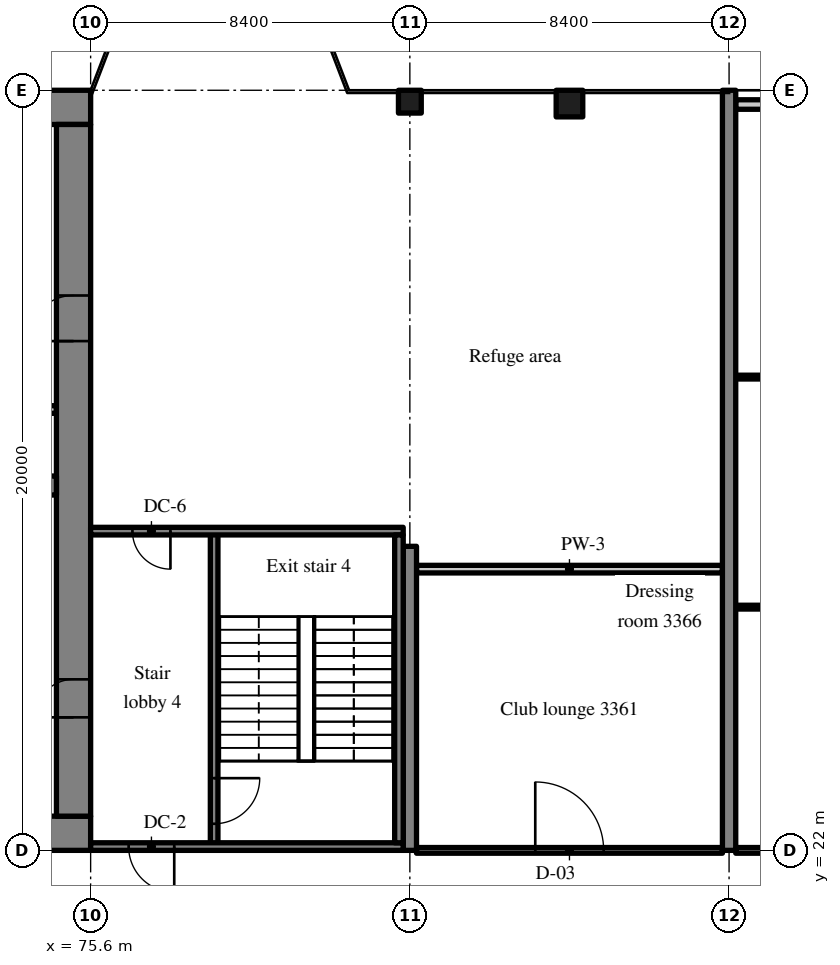
"""IFC4 building model, lengths in metres.
Left out: names, types, materials, properties, quantities, classifications, styles, units other than length and angle.
Written with IfcOpenShell. Run it as: python <this file> out.ifc"""

import sys

from ifc_helpers import new_model, si_unit, direction, frame, frame_2d, origin, origin_2d, place, context, subcontext, project, spatial, rectangle, extrude, source, transform, mapped, element, fill, save


model = new_model("IFC4")
c1 = context("Model", 3, precision=1e-05, world=origin(), true_north=direction((0.0, 1.0)))
c2 = subcontext(c1, "Body", "Model", "MODEL_VIEW")
j1 = project(units=[si_unit("LENGTHUNIT", "METRE"), si_unit("PLANEANGLEUNIT", "RADIAN")], contexts=[c1])
p1 = place(None, origin())
s1 = spatial("IfcSite", under=j1, at=p1, CompositionType="ELEMENT")
p2 = place(p1, origin())
s2 = spatial("IfcBuilding", under=s1, at=p2, CompositionType="ELEMENT")
p3 = place(p2, frame((0.0, 0.0, 137.0)))
s3 = spatial("IfcBuildingStorey", under=s2, at=p3, CompositionType="ELEMENT", Elevation=137.0)
m1 = source(origin(), c2, "Body", "SweptSolid", [
    extrude(rectangle(XDim=50.4, YDim=0.9, at=frame_2d((25.2, 0.0))), origin(), (0.0, 0.0, 1.0), 3.52),
])
p4 = place(p3, frame((25.2, 22.45, 0.0), z_axis=(0.0, 0.0, 1.0), x_axis=(1.0, 0.0, 0.0)))
e1 = element("IfcWall", 1, at=p4, inside=s3, PredefinedType="SHEAR", context=c2, shape_type="MappedRepresentation", body=[
    mapped(m1, transform((0.0, 0.0, 0.0), scale=1.0)),
])
m2 = source(origin(), c2, "Body", "SweptSolid", [
    extrude(rectangle(XDim=1.8, YDim=2.1, at=frame_2d((0.9, 1.05))), frame((0.0, 0.46, 0.0), z_axis=(0.0, -1.0, 0.0), x_axis=(1.0, 0.0, 0.0)), (0.0, 0.0, 1.0), 0.92),
])
p5 = place(p4, frame((15.9, 0.0, 0.0)))
e2 = element("IfcOpeningElement", 2, at=p5, cuts=e1, PredefinedType="OPENING", context=c2, shape_type="MappedRepresentation", body=[
    mapped(m2, transform((0.0, 0.0, 0.0), scale=1.0)),
])
m3 = source(origin(), c2, "Body", "SweptSolid", [
    extrude(rectangle(XDim=1.2, YDim=2.1, at=frame_2d((0.6, 1.05))), frame((0.0, 0.46, 0.0), z_axis=(0.0, -1.0, 0.0), x_axis=(1.0, 0.0, 0.0)), (0.0, 0.0, 1.0), 0.92),
])
p6 = place(p4, frame((26.975, 0.0, 0.0)))
e3 = element("IfcOpeningElement", 3, at=p6, cuts=e1, PredefinedType="OPENING", context=c2, shape_type="MappedRepresentation", body=[
    mapped(m3, transform((0.0, 0.0, 0.0), scale=1.0)),
])
m4 = source(origin(), c2, "Body", "SweptSolid", [
    extrude(rectangle(XDim=0.9, YDim=2.1, at=frame_2d((0.45, 1.05))), frame((0.0, 0.46, 0.0), z_axis=(0.0, -1.0, 0.0), x_axis=(1.0, 0.0, 0.0)), (0.0, 0.0, 1.0), 0.92),
])
p7 = place(p4, frame((34.5, 0.0, 0.0)))
e4 = element("IfcOpeningElement", 4, at=p7, cuts=e1, PredefinedType="OPENING", context=c2, shape_type="MappedRepresentation", body=[
    mapped(m4, transform((0.0, 0.0, 0.0), scale=1.0)),
])
p8 = place(p4, frame((31.5, 0.0, 0.0)))
e5 = element("IfcOpeningElement", 5, at=p8, cuts=e1, PredefinedType="OPENING", context=c2, shape_type="MappedRepresentation", body=[
    mapped(m4, transform((0.0, 0.0, 0.0), scale=1.0)),
])
p9 = place(p4, frame((39.788, 0.0, 0.0)))
e6 = element("IfcOpeningElement", 6, at=p9, cuts=e1, PredefinedType="OPENING", context=c2, shape_type="MappedRepresentation", body=[
    mapped(m4, transform((0.0, 0.0, 0.0), scale=1.0)),
])
p10 = place(p4, frame((36.762, 0.0, 0.0)))
e7 = element("IfcOpeningElement", 7, at=p10, cuts=e1, PredefinedType="OPENING", context=c2, shape_type="MappedRepresentation", body=[
    mapped(m4, transform((0.0, 0.0, 0.0), scale=1.0)),
])
p11 = place(p4, frame((6.45, 0.0, 0.0)))
e8 = element("IfcOpeningElement", 8, at=p11, cuts=e1, PredefinedType="OPENING", context=c2, shape_type="MappedRepresentation", body=[
    mapped(m3, transform((0.0, 0.0, 0.0), scale=1.0)),
])
p12 = place(p4, frame((47.775, 0.0, 0.0)))
e9 = element("IfcOpeningElement", 9, at=p12, cuts=e1, PredefinedType="OPENING", context=c2, shape_type="MappedRepresentation", body=[
    mapped(m3, transform((0.0, 0.0, 0.0), scale=1.0)),
])
p13 = place(p3, frame((25.2, 41.55, 0.0), z_axis=(0.0, 0.0, 1.0), x_axis=(1.0, 0.0, 0.0)))
e10 = element("IfcWall", 10, at=p13, inside=s3, PredefinedType="SHEAR", context=c2, shape_type="MappedRepresentation", body=[
    mapped(m1, transform((0.0, 0.0, 0.0), scale=1.0)),
])
m5 = source(origin(), c2, "Body", "SweptSolid", [
    extrude(rectangle(XDim=18.2, YDim=0.9, at=frame_2d((9.1, 0.0))), origin(), (0.0, 0.0, 1.0), 3.52),
])
p14 = place(p3, frame((75.15, 22.9, 0.0), z_axis=(0.0, 0.0, 1.0), x_axis=(0.0, 1.0, 0.0)))
e11 = element("IfcWall", 11, at=p14, inside=s3, PredefinedType="SHEAR", context=c2, shape_type="MappedRepresentation", body=[
    mapped(m5, transform((0.0, 0.0, 0.0), scale=1.0)),
])
m6 = source(origin(), c2, "Body", "SweptSolid", [
    extrude(rectangle(XDim=1.0, YDim=2.1, at=frame_2d((0.5, 1.05))), frame((0.0, 0.46, 0.0), z_axis=(0.0, -1.0, 0.0), x_axis=(1.0, 0.0, 0.0)), (0.0, 0.0, 1.0), 0.92),
])
p15 = place(p14, frame((2.6, 0.0, 0.0)))
e12 = element("IfcOpeningElement", 12, at=p15, cuts=e11, PredefinedType="OPENING", context=c2, shape_type="MappedRepresentation", body=[
    mapped(m6, transform((0.0, 0.0, 0.0), scale=1.0)),
])
p16 = place(p14, frame((12.5, 0.0, 0.0)))
e13 = element("IfcOpeningElement", 13, at=p16, cuts=e11, PredefinedType="OPENING", context=c2, shape_type="MappedRepresentation", body=[
    mapped(m3, transform((0.0, 0.0, 0.0), scale=1.0)),
])
m7 = source(origin(), c2, "Body", "SweptSolid", [
    extrude(rectangle(XDim=7.25, YDim=0.5, at=frame_2d((3.625, 0.0))), origin(), (0.0, 0.0, 1.0), 3.52),
])
p17 = place(p3, frame((67.45, 31.6, 0.0), z_axis=(0.0, 0.0, 1.0), x_axis=(1.0, 0.0, 0.0)))
e14 = element("IfcWall", 14, at=p17, inside=s3, PredefinedType="SHEAR", context=c2, shape_type="MappedRepresentation", body=[
    mapped(m7, transform((0.0, 0.0, 0.0), scale=1.0)),
])
m8 = source(origin(), c2, "Body", "SweptSolid", [
    extrude(rectangle(XDim=1.1, YDim=2.1, at=frame_2d((0.55, 1.05))), frame((0.0, 0.26, 0.0), z_axis=(0.0, -1.0, 0.0), x_axis=(1.0, 0.0, 0.0)), (0.0, 0.0, 1.0), 0.52),
])
p18 = place(p17, frame((5.575, 0.0, 0.0)))
e15 = element("IfcOpeningElement", 15, at=p18, cuts=e14, PredefinedType="OPENING", context=c2, shape_type="MappedRepresentation", body=[
    mapped(m8, transform((0.0, 0.0, 0.0), scale=1.0)),
])
m9 = source(origin(), c2, "Body", "SweptSolid", [
    extrude(rectangle(XDim=8.0, YDim=0.35, at=frame_2d((4.0, 0.0))), origin(), (0.0, 0.0, 1.0), 3.52),
])
p19 = place(p3, frame((84.0, 22.0, 0.0), z_axis=(0.0, 0.0, 1.0), x_axis=(0.0, 1.0, 0.0)))
e16 = element("IfcWall", 16, at=p19, inside=s3, PredefinedType="SHEAR", context=c2, shape_type="MappedRepresentation", body=[
    mapped(m9, transform((0.0, 0.0, 0.0), scale=1.0)),
])
m10 = source(origin(), c2, "Body", "SweptSolid", [
    extrude(rectangle(XDim=20.0, YDim=0.35, at=frame_2d((10.0, 0.0))), origin(), (0.0, 0.0, 1.0), 3.52),
])
p20 = place(p3, frame((92.4, 22.0, 0.0), z_axis=(0.0, 0.0, 1.0), x_axis=(0.0, 1.0, 0.0)))
e17 = element("IfcWall", 17, at=p20, inside=s3, PredefinedType="SHEAR", context=c2, shape_type="MappedRepresentation", body=[
    mapped(m10, transform((0.0, 0.0, 0.0), scale=1.0)),
])
m11 = source(origin(), c2, "Body", "SweptSolid", [
    extrude(rectangle(XDim=0.6, YDim=0.6, at=origin_2d()), origin(), (0.0, 0.0, 1.0), 3.52),
])
p21 = place(p3, frame((84.0, 41.7, 0.0), z_axis=(0.0, 0.0, 1.0), x_axis=(1.0, 0.0, 0.0)))
e18 = element("IfcColumn", 18, at=p21, inside=s3, PredefinedType="COLUMN", context=c2, shape_type="MappedRepresentation", body=[
    mapped(m11, transform((0.0, 0.0, 0.0), scale=1.0)),
])
m12 = source(origin(), c2, "Body", "SweptSolid", [
    extrude(rectangle(XDim=0.7, YDim=0.7, at=origin_2d()), origin(), (0.0, 0.0, 1.0), 3.52),
])
p22 = place(p3, frame((88.2, 41.65, 0.0), z_axis=(0.0, 0.0, 1.0), x_axis=(1.0, 0.0, 0.0)))
e19 = element("IfcColumn", 19, at=p22, inside=s3, PredefinedType="COLUMN", context=c2, shape_type="MappedRepresentation", body=[
    mapped(m12, transform((0.0, 0.0, 0.0), scale=1.0)),
])
m13 = source(origin(), c2, "Body", "SweptSolid", [
    extrude(rectangle(XDim=4.07, YDim=0.25, at=frame_2d((2.035, 0.0))), origin(), (0.0, 0.0, 1.0), 2.82),
])
p23 = place(p3, frame((96.645, 41.625, 0.0), z_axis=(0.0, 0.0, 1.0), x_axis=(-1.0, 0.0, 0.0)))
e20 = element("IfcWall", 20, at=p23, inside=s3, PredefinedType="SOLIDWALL", context=c2, shape_type="MappedRepresentation", body=[
    mapped(m13, transform((0.0, 0.0, 0.0), scale=1.0)),
])
m14 = source(origin(), c2, "Body", "SweptSolid", [
    extrude(rectangle(XDim=1.5, YDim=1.5, at=frame_2d((0.75, 0.75))), frame((0.0, 0.135, 0.0), z_axis=(0.0, -1.0, 0.0), x_axis=(1.0, 0.0, 0.0)), (0.0, 0.0, 1.0), 0.27),
])
p24 = place(p23, frame((1.285, 0.0, 0.9)))
e21 = element("IfcOpeningElement", 21, at=p24, cuts=e20, PredefinedType="OPENING", context=c2, shape_type="MappedRepresentation", body=[
    mapped(m14, transform((0.0, 0.0, 0.0), scale=1.0)),
])
m15 = source(origin(), c2, "Body", "SweptSolid", [
    extrude(rectangle(XDim=2.25, YDim=0.2, at=frame_2d((1.125, 0.0))), origin(), (0.0, 0.0, 1.0), 3.52),
])
p25 = place(p3, frame((72.45, 33.6, 0.0), z_axis=(0.0, 0.0, 1.0), x_axis=(1.0, 0.0, 0.0)))
e22 = element("IfcWall", 22, at=p25, inside=s3, PredefinedType="SOLIDWALL", context=c2, shape_type="MappedRepresentation", body=[
    mapped(m15, transform((0.0, 0.0, 0.0), scale=1.0)),
])
m16 = source(origin(), c2, "Body", "SweptSolid", [
    extrude(rectangle(XDim=8.3, YDim=0.2, at=frame_2d((4.15, 0.0))), origin(), (0.0, 0.0, 1.0), 3.52),
])
p26 = place(p3, frame((78.85, 22.1, 0.0), z_axis=(0.0, 0.0, 1.0), x_axis=(0.0, 1.0, 0.0)))
e23 = element("IfcWall", 23, at=p26, inside=s3, PredefinedType="SOLIDWALL", context=c2, shape_type="MappedRepresentation", body=[
    mapped(m16, transform((0.0, 0.0, 0.0), scale=1.0)),
])
m17 = source(origin(), c2, "Body", "SweptSolid", [
    extrude(rectangle(XDim=1.2, YDim=2.1, at=frame_2d((0.6, 1.05))), frame((0.0, 0.11, 0.0), z_axis=(0.0, -1.0, 0.0), x_axis=(1.0, 0.0, 0.0)), (0.0, 0.0, 1.0), 0.22),
])
p27 = place(p26, frame((0.6, 0.0, 0.0)))
e24 = element("IfcOpeningElement", 24, at=p27, cuts=e23, PredefinedType="OPENING", context=c2, shape_type="MappedRepresentation", body=[
    mapped(m17, transform((0.0, 0.0, 0.0), scale=1.0)),
])
m18 = source(origin(), c2, "Body", "SweptSolid", [
    extrude(rectangle(XDim=8.225, YDim=0.2, at=frame_2d((4.112, 0.0))), origin(), (0.0, 0.0, 1.0), 3.52),
])
p28 = place(p3, frame((83.825, 22.1, 0.0), z_axis=(0.0, 0.0, 1.0), x_axis=(-1.0, 0.0, 0.0)))
e25 = element("IfcWall", 25, at=p28, inside=s3, PredefinedType="SOLIDWALL", context=c2, shape_type="MappedRepresentation", body=[
    mapped(m18, transform((0.0, 0.0, 0.0), scale=1.0)),
])
p29 = place(p28, frame((6.025, 0.0, 0.0)))
e26 = element("IfcOpeningElement", 26, at=p29, cuts=e25, PredefinedType="OPENING", context=c2, shape_type="MappedRepresentation", body=[
    mapped(m17, transform((0.0, 0.0, 0.0), scale=1.0)),
])
p30 = place(p3, frame((83.825, 30.4, 0.0), z_axis=(0.0, 0.0, 1.0), x_axis=(-1.0, 0.0, 0.0)))
e27 = element("IfcWall", 27, at=p30, inside=s3, PredefinedType="SOLIDWALL", context=c2, shape_type="MappedRepresentation", body=[
    mapped(m18, transform((0.0, 0.0, 0.0), scale=1.0)),
])
m19 = source(origin(), c2, "Body", "SweptSolid", [
    extrude(rectangle(XDim=1.0, YDim=2.1, at=frame_2d((0.5, 1.05))), frame((0.0, 0.11, 0.0), z_axis=(0.0, -1.0, 0.0), x_axis=(1.0, 0.0, 0.0)), (0.0, 0.0, 1.0), 0.22),
])
p31 = place(p30, frame((6.125, 0.0, 0.0)))
e28 = element("IfcOpeningElement", 28, at=p31, cuts=e27, PredefinedType="OPENING", context=c2, shape_type="MappedRepresentation", body=[
    mapped(m19, transform((0.0, 0.0, 0.0), scale=1.0)),
])
m20 = source(origin(), c2, "Body", "SweptSolid", [
    extrude(rectangle(XDim=8.1, YDim=0.225, at=frame_2d((4.05, 0.0))), origin(), (0.0, 0.0, 1.0), 3.52),
])
p32 = place(p3, frame((83.713, 22.2, 0.0), z_axis=(0.0, 0.0, 1.0), x_axis=(0.0, 1.0, 0.0)))
e29 = element("IfcWall", 29, at=p32, inside=s3, PredefinedType="SOLIDWALL", context=c2, shape_type="MappedRepresentation", body=[
    mapped(m20, transform((0.0, 0.0, 0.0), scale=1.0)),
])
m21 = source(origin(), c2, "Body", "SweptSolid", [
    extrude(rectangle(XDim=8.05, YDim=0.15, at=frame_2d((4.025, 0.0))), origin(), (0.0, 0.0, 1.0), 2.82),
])
p33 = place(p3, frame((84.175, 22.0, 0.0), z_axis=(0.0, 0.0, 1.0), x_axis=(1.0, 0.0, 0.0)))
e30 = element("IfcWall", 30, at=p33, inside=s3, PredefinedType="PARTITIONING", context=c2, shape_type="MappedRepresentation", body=[
    mapped(m21, transform((0.0, 0.0, 0.0), scale=1.0)),
])
m22 = source(origin(), c2, "Body", "SweptSolid", [
    extrude(rectangle(XDim=1.8, YDim=2.1, at=frame_2d((0.9, 1.05))), frame((0.0, 0.085, 0.0), z_axis=(0.0, -1.0, 0.0), x_axis=(1.0, 0.0, 0.0)), (0.0, 0.0, 1.0), 0.17),
])
p34 = place(p33, frame((3.125, 0.0, 0.0)))
e31 = element("IfcOpeningElement", 31, at=p34, cuts=e30, PredefinedType="OPENING", context=c2, shape_type="MappedRepresentation", body=[
    mapped(m22, transform((0.0, 0.0, 0.0), scale=1.0)),
])
m23 = source(origin(), c2, "Body", "SweptSolid", [
    extrude(rectangle(XDim=8.05, YDim=0.2, at=frame_2d((4.025, 0.0))), origin(), (0.0, 0.0, 1.0), 3.52),
])
p35 = place(p3, frame((84.175, 29.4, 0.0), z_axis=(0.0, 0.0, 1.0), x_axis=(1.0, 0.0, 0.0)))
e32 = element("IfcWall", 32, at=p35, inside=s3, PredefinedType="PARTITIONING", context=c2, shape_type="MappedRepresentation", body=[
    mapped(m23, transform((0.0, 0.0, 0.0), scale=1.0)),
])
m24 = source(origin(), c2, "Body", "SweptSolid", [
    extrude(rectangle(XDim=2.425, YDim=0.1, at=frame_2d((1.212, 0.0))), origin(), (0.0, 0.0, 1.0), 3.52),
])
p36 = place(p3, frame((92.575, 28.4, 0.0), z_axis=(0.0, 0.0, 1.0), x_axis=(1.0, 0.0, 0.0)))
e33 = element("IfcWall", 33, at=p36, inside=s3, PredefinedType="PARTITIONING", context=c2, shape_type="MappedRepresentation", body=[
    mapped(m24, transform((0.0, 0.0, 0.0), scale=1.0)),
])
m25 = source(origin(), c2, "Body", "SweptSolid", [
    extrude(rectangle(XDim=0.9, YDim=2.1, at=frame_2d((0.45, 1.05))), frame((0.0, 0.06, 0.0), z_axis=(0.0, -1.0, 0.0), x_axis=(1.0, 0.0, 0.0)), (0.0, 0.0, 1.0), 0.12),
])
p37 = place(p36, frame((0.763, 0.0, 0.0)))
e34 = element("IfcOpeningElement", 34, at=p37, cuts=e33, PredefinedType="OPENING", context=c2, shape_type="MappedRepresentation", body=[
    mapped(m25, transform((0.0, 0.0, 0.0), scale=1.0)),
])
m26 = source(origin(), c2, "Body", "SweptSolid", [
    extrude(rectangle(XDim=7.875, YDim=0.1, at=frame_2d((3.938, 0.0))), origin(), (0.0, 0.0, 1.0), 3.52),
])
p38 = place(p3, frame((92.575, 34.453, 0.0), z_axis=(0.0, 0.0, 1.0), x_axis=(1.0, 0.0, 0.0)))
e35 = element("IfcWall", 35, at=p38, inside=s3, PredefinedType="PARTITIONING", context=c2, shape_type="MappedRepresentation", body=[
    mapped(m26, transform((0.0, 0.0, 0.0), scale=1.0)),
])
m27 = source(origin(), c2, "Body", "SweptSolid", [
    extrude(rectangle(XDim=1.8, YDim=2.1, at=frame_2d((0.9, 1.05))), frame((0.0, 0.06, 0.0), z_axis=(0.0, -1.0, 0.0), x_axis=(1.0, 0.0, 0.0)), (0.0, 0.0, 1.0), 0.12),
])
p39 = place(p38, frame((3.037, 0.0, 0.0)))
e36 = element("IfcOpeningElement", 36, at=p39, cuts=e35, PredefinedType="OPENING", context=c2, shape_type="MappedRepresentation", body=[
    mapped(m27, transform((0.0, 0.0, 0.0), scale=1.0)),
])
m28 = source(origin(), c2, "Body", "SweptSolid", [
    extrude(rectangle(XDim=7.875, YDim=0.15, at=frame_2d((3.938, 0.0))), origin(), (0.0, 0.0, 1.0), 2.82),
])
p40 = place(p3, frame((92.575, 22.0, 0.0), z_axis=(0.0, 0.0, 1.0), x_axis=(1.0, 0.0, 0.0)))
e37 = element("IfcWall", 37, at=p40, inside=s3, PredefinedType="PARTITIONING", context=c2, shape_type="MappedRepresentation", body=[
    mapped(m28, transform((0.0, 0.0, 0.0), scale=1.0)),
])
m29 = source(origin(), c2, "Body", "SweptSolid", [
    extrude(rectangle(XDim=1.0, YDim=2.1, at=frame_2d((0.5, 1.05))), frame((0.0, 0.085, 0.0), z_axis=(0.0, -1.0, 0.0), x_axis=(1.0, 0.0, 0.0)), (0.0, 0.0, 1.0), 0.17),
])
p41 = place(p40, frame((6.475, 0.0, 0.0)))
e38 = element("IfcOpeningElement", 38, at=p41, cuts=e37, PredefinedType="OPENING", context=c2, shape_type="MappedRepresentation", body=[
    mapped(m29, transform((0.0, 0.0, 0.0), scale=1.0)),
])
m30 = source(origin(), c2, "Body", "SweptSolid", [
    extrude(rectangle(XDim=1.0, YDim=2.1, at=frame_2d((0.5, 1.05))), frame((0.0, 0.025, 0.0), z_axis=(0.0, -1.0, 0.0), x_axis=(1.0, 0.0, 0.0)), (0.0, 0.0, 1.0), 0.05),
])
p42 = place(p15, origin())
e39 = element("IfcDoor", 39, at=p42, inside=s3, OperationType="SINGLE_SWING_LEFT", PredefinedType="DOOR", context=c2, shape_type="MappedRepresentation", body=[
    mapped(m30, transform((0.0, 0.0, 0.0), scale=1.0)),
])
fill(e12, e39)
m31 = source(origin(), c2, "Body", "SweptSolid", [
    extrude(rectangle(XDim=1.2, YDim=2.1, at=frame_2d((0.6, 1.05))), frame((0.0, 0.025, 0.0), z_axis=(0.0, -1.0, 0.0), x_axis=(1.0, 0.0, 0.0)), (0.0, 0.0, 1.0), 0.05),
])
p43 = place(p16, origin())
e40 = element("IfcDoor", 40, at=p43, inside=s3, OperationType="SINGLE_SWING_LEFT", PredefinedType="DOOR", context=c2, shape_type="MappedRepresentation", body=[
    mapped(m31, transform((0.0, 0.0, 0.0), scale=1.0)),
])
fill(e13, e40)
p44 = place(p27, origin())
e41 = element("IfcDoor", 41, at=p44, inside=s3, OperationType="SINGLE_SWING_RIGHT", PredefinedType="DOOR", context=c2, shape_type="MappedRepresentation", body=[
    mapped(m31, transform((0.0, 0.0, 0.0), scale=1.0)),
])
fill(e24, e41)
p45 = place(p29, origin())
e42 = element("IfcDoor", 42, at=p45, inside=s3, OperationType="SINGLE_SWING_LEFT", PredefinedType="DOOR", context=c2, shape_type="MappedRepresentation", body=[
    mapped(m31, transform((0.0, 0.0, 0.0), scale=1.0)),
])
fill(e26, e42)
p46 = place(p31, origin())
e43 = element("IfcDoor", 43, at=p46, inside=s3, OperationType="SINGLE_SWING_LEFT", PredefinedType="DOOR", context=c2, shape_type="MappedRepresentation", body=[
    mapped(m30, transform((0.0, 0.0, 0.0), scale=1.0)),
])
fill(e28, e43)
m32 = source(origin(), c2, "Body", "SweptSolid", [
    extrude(rectangle(XDim=1.8, YDim=2.1, at=frame_2d((0.9, 1.05))), frame((0.0, 0.025, 0.0), z_axis=(0.0, -1.0, 0.0), x_axis=(1.0, 0.0, 0.0)), (0.0, 0.0, 1.0), 0.05),
])
p47 = place(p34, origin())
e44 = element("IfcDoor", 44, at=p47, inside=s3, OperationType="DOUBLE_DOOR_SINGLE_SWING", PredefinedType="DOOR", context=c2, shape_type="MappedRepresentation", body=[
    mapped(m32, transform((0.0, 0.0, 0.0), scale=1.0)),
])
fill(e31, e44)
save(model, sys.argv[1])
